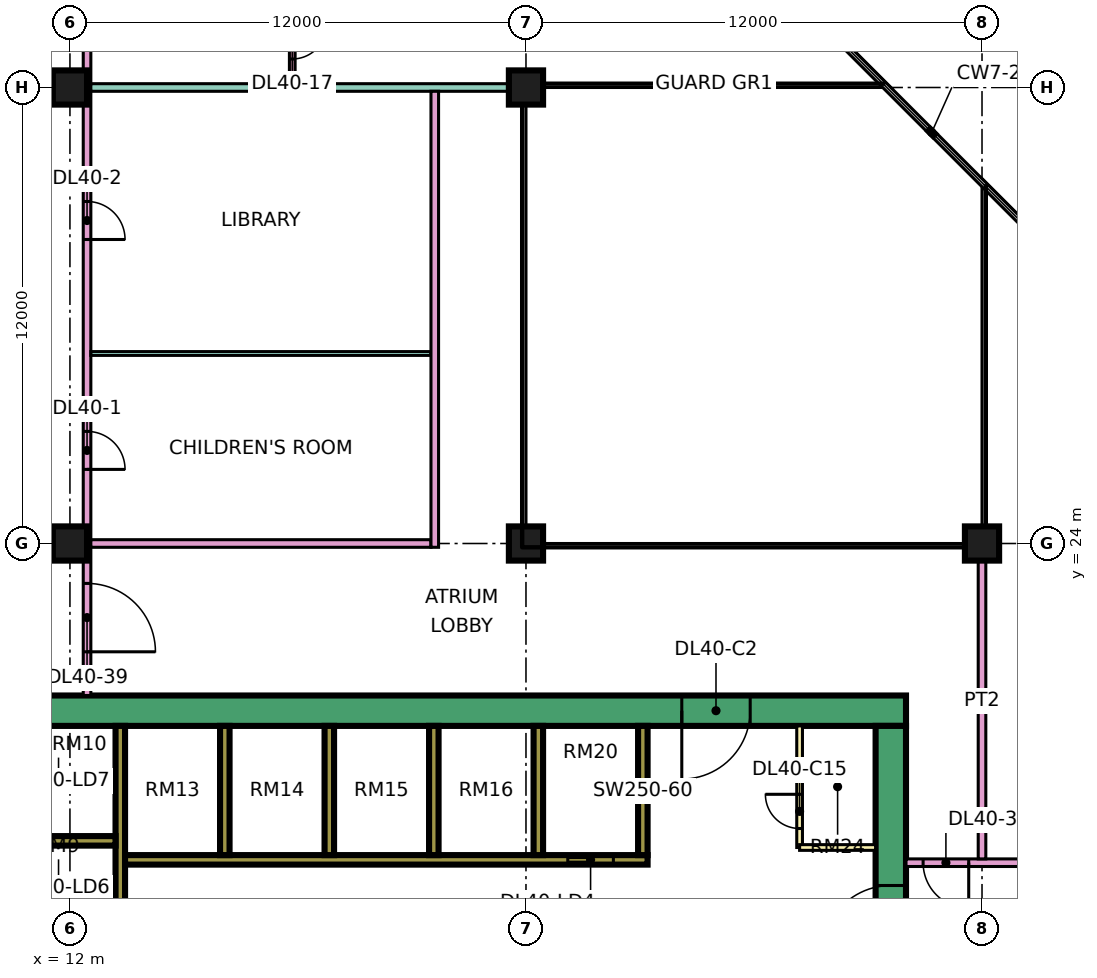
"""IFC4 building model, lengths in metres.
Left out: names, types, materials, properties, quantities, classifications, styles, units other than length and angle.
Written with IfcOpenShell. Run it as: python <this file> out.ifc"""

import sys

from ifc_helpers import new_model, si_unit, direction, frame, frame_2d, origin, origin_2d, place, context, subcontext, project, spatial, rectangle, extrude, element, fill, save


model = new_model("IFC4")
c1 = context("Model", 3, precision=1e-05, world=origin(), true_north=direction((0.0, 1.0)))
c2 = subcontext(c1, "Body", "Model", "MODEL_VIEW")
j1 = project(units=[si_unit("LENGTHUNIT", "METRE"), si_unit("PLANEANGLEUNIT", "RADIAN")], contexts=[c1])
p1 = place(None, origin())
s1 = spatial("IfcSite", under=j1, at=p1, CompositionType="ELEMENT")
p2 = place(p1, origin())
s2 = spatial("IfcBuilding", under=s1, at=p2, CompositionType="ELEMENT")
p3 = place(p2, frame((0.0, 0.0, 176.15)))
s3 = spatial("IfcBuildingStorey", under=s2, at=p3, CompositionType="ELEMENT", Elevation=176.15)
for number, where, z_axis, x_axis in (
    (1, (12.0, 24.0, 0.0), (0.0, 0.0, 1.0), (1.0, 0.0, 0.0)),
    (2, (12.0, 36.0, 0.0), (0.0, 0.0, 1.0), (1.0, 0.0, 0.0)),
    (3, (24.0, 24.0, 0.0), (0.0, 0.0, 1.0), (1.0, 0.0, 0.0)),
    (4, (24.0, 36.0, 0.0), (0.0, 0.0, 1.0), (1.0, 0.0, 0.0)),
    (5, (36.0, 24.0, 0.0), (0.0, 0.0, 1.0), (1.0, 0.0, 0.0)),
):
    element("IfcColumn", number, at=place(p3, frame(where, z_axis=z_axis, x_axis=x_axis)), inside=s3, PredefinedType="COLUMN", context=c2, shape_type="SweptSolid", body=[
        extrude(rectangle(XDim=0.9, YDim=0.9, at=origin_2d()), origin(), (0.0, 0.0, 1.0), 3.75),
    ])
p4 = place(p3, frame((9.0, 19.6, 0.0), z_axis=(0.0, 0.0, 1.0), x_axis=(1.0, 0.0, 0.0)))
e6 = element("IfcWall", 6, at=p4, inside=s3, PredefinedType="SHEAR", context=c2, shape_type="SweptSolid", body=[
    extrude(rectangle(XDim=25.0, YDim=0.8, at=frame_2d((12.5, 0.0))), origin(), (0.0, 0.0, 1.0), 3.75),
])
p5 = place(p4, frame((19.1, 0.0, 0.0)))
e7 = element("IfcOpeningElement", 7, at=p5, cuts=e6, PredefinedType="OPENING", context=c2, shape_type="SweptSolid", body=[
    extrude(rectangle(XDim=1.8, YDim=2.4, at=frame_2d((0.9, 1.2))), frame((0.0, 0.41, 0.0), z_axis=(0.0, -1.0, 0.0), x_axis=(1.0, 0.0, 0.0)), (0.0, 0.0, 1.0), 0.82),
])
p6 = place(p3, frame((33.6, 7.8, 0.0), z_axis=(0.0, 0.0, 1.0), x_axis=(0.0, 1.0, 0.0)))
e8 = element("IfcWall", 8, at=p6, inside=s3, PredefinedType="SHEAR", context=c2, shape_type="SweptSolid", body=[
    extrude(rectangle(XDim=11.4, YDim=0.8, at=frame_2d((5.7, 0.0))), origin(), (0.0, 0.0, 1.0), 3.75),
])
p7 = place(p6, frame((5.4, 0.0, 0.0)))
e9 = element("IfcOpeningElement", 9, at=p7, cuts=e8, PredefinedType="OPENING", context=c2, shape_type="SweptSolid", body=[
    extrude(rectangle(XDim=1.8, YDim=2.4, at=frame_2d((0.9, 1.2))), frame((0.0, 0.41, 0.0), z_axis=(0.0, -1.0, 0.0), x_axis=(1.0, 0.0, 0.0)), (0.0, 0.0, 1.0), 0.82),
])
p8 = place(p3, frame((13.325, 7.8, 0.0), z_axis=(0.0, 0.0, 1.0), x_axis=(0.0, 1.0, 0.0)))
e10 = element("IfcWall", 10, at=p8, inside=s3, PredefinedType="SHEAR", context=c2, shape_type="SweptSolid", body=[
    extrude(rectangle(XDim=11.4, YDim=0.25, at=frame_2d((5.7, 0.0))), origin(), (0.0, 0.0, 1.0), 3.75),
])
p9 = place(p3, frame((13.45, 15.675, 0.0), z_axis=(0.0, 0.0, 1.0), x_axis=(1.0, 0.0, 0.0)))
e11 = element("IfcWall", 11, at=p9, inside=s3, PredefinedType="SHEAR", context=c2, shape_type="SweptSolid", body=[
    extrude(rectangle(XDim=13.75, YDim=0.25, at=frame_2d((6.875, 0.0))), origin(), (0.0, 0.0, 1.0), 3.75),
])
p10 = place(p9, frame((11.65, 0.0, 0.0)))
e12 = element("IfcOpeningElement", 12, at=p10, cuts=e11, PredefinedType="OPENING", context=c2, shape_type="SweptSolid", body=[
    extrude(rectangle(XDim=1.2, YDim=2.2, at=frame_2d((0.6, 1.1))), frame((0.0, 0.135, 0.0), z_axis=(0.0, -1.0, 0.0), x_axis=(1.0, 0.0, 0.0)), (0.0, 0.0, 1.0), 0.27),
])
p11 = place(p3, frame((10.2, 16.175, 0.0), z_axis=(0.0, 0.0, 1.0), x_axis=(1.0, 0.0, 0.0)))
e13 = element("IfcWall", 13, at=p11, inside=s3, PredefinedType="SHEAR", context=c2, shape_type="SweptSolid", body=[
    extrude(rectangle(XDim=3.0, YDim=0.25, at=frame_2d((1.5, 0.0))), origin(), (0.0, 0.0, 1.0), 3.75),
])
for number, where, z_axis, x_axis in (
    (14, (16.075, 15.8, 0.0), (0.0, 0.0, 1.0), (0.0, 1.0, 0.0)),
    (15, (18.825, 15.8, 0.0), (0.0, 0.0, 1.0), (0.0, 1.0, 0.0)),
    (16, (21.575, 15.8, 0.0), (0.0, 0.0, 1.0), (0.0, 1.0, 0.0)),
    (17, (24.325, 15.8, 0.0), (0.0, 0.0, 1.0), (0.0, 1.0, 0.0)),
    (18, (27.075, 15.8, 0.0), (0.0, 0.0, 1.0), (0.0, 1.0, 0.0)),
):
    element("IfcWall", number, at=place(p3, frame(where, z_axis=z_axis, x_axis=x_axis)), inside=s3, PredefinedType="SHEAR", context=c2, shape_type="SweptSolid", body=[
        extrude(rectangle(XDim=3.4, YDim=0.25, at=frame_2d((1.7, 0.0))), origin(), (0.0, 0.0, 1.0), 3.75),
    ])
p12 = place(p3, frame((31.2, 16.0, 0.0), z_axis=(0.0, 0.0, 1.0), x_axis=(0.0, 1.0, 0.0)))
e19 = element("IfcWall", 19, at=p12, inside=s3, PredefinedType="PARTITIONING", context=c2, shape_type="SweptSolid", body=[
    extrude(rectangle(XDim=3.2, YDim=0.15, at=frame_2d((1.6, 0.0))), origin(), (0.0, 0.0, 1.0), 3.35),
])
p13 = place(p12, frame((0.5, 0.0, 0.0)))
e20 = element("IfcOpeningElement", 20, at=p13, cuts=e19, PredefinedType="OPENING", context=c2, shape_type="SweptSolid", body=[
    extrude(rectangle(XDim=0.9, YDim=2.1, at=frame_2d((0.45, 1.05))), frame((0.0, 0.085, 0.0), z_axis=(0.0, -1.0, 0.0), x_axis=(1.0, 0.0, 0.0)), (0.0, 0.0, 1.0), 0.17),
])
p14 = place(p3, frame((31.2, 16.0, 0.0), z_axis=(0.0, 0.0, 1.0), x_axis=(1.0, 0.0, 0.0)))
e21 = element("IfcWall", 21, at=p14, inside=s3, PredefinedType="PARTITIONING", context=c2, shape_type="SweptSolid", body=[
    extrude(rectangle(XDim=2.0, YDim=0.15, at=frame_2d((1.0, 0.0))), origin(), (0.0, 0.0, 1.0), 3.35),
])
p15 = place(p3, frame((12.45, 20.0, 0.0), z_axis=(0.0, 0.0, 1.0), x_axis=(0.0, 1.0, 0.0)))
e22 = element("IfcWall", 22, at=p15, inside=s3, PredefinedType="PARTITIONING", context=c2, shape_type="SweptSolid", body=[
    extrude(rectangle(XDim=43.0, YDim=0.2, at=frame_2d((21.5, 0.0))), origin(), (0.0, 0.0, 1.0), 3.35),
])
p16 = place(p15, frame((5.95, 0.0, 0.0)))
e23 = element("IfcOpeningElement", 23, at=p16, cuts=e22, PredefinedType="OPENING", context=c2, shape_type="SweptSolid", body=[
    extrude(rectangle(XDim=1.0, YDim=2.1, at=frame_2d((0.5, 1.05))), frame((0.0, 0.11, 0.0), z_axis=(0.0, -1.0, 0.0), x_axis=(1.0, 0.0, 0.0)), (0.0, 0.0, 1.0), 0.22),
])
p17 = place(p15, frame((12.0, 0.0, 0.0)))
e24 = element("IfcOpeningElement", 24, at=p17, cuts=e22, PredefinedType="OPENING", context=c2, shape_type="SweptSolid", body=[
    extrude(rectangle(XDim=1.0, YDim=2.1, at=frame_2d((0.5, 1.05))), frame((0.0, 0.11, 0.0), z_axis=(0.0, -1.0, 0.0), x_axis=(1.0, 0.0, 0.0)), (0.0, 0.0, 1.0), 0.22),
])
p18 = place(p15, frame((22.75, 0.0, 0.0)))
e25 = element("IfcOpeningElement", 25, at=p18, cuts=e22, PredefinedType="OPENING", context=c2, shape_type="SweptSolid", body=[
    extrude(rectangle(XDim=1.0, YDim=2.1, at=frame_2d((0.5, 1.05))), frame((0.0, 0.11, 0.0), z_axis=(0.0, -1.0, 0.0), x_axis=(1.0, 0.0, 0.0)), (0.0, 0.0, 1.0), 0.22),
])
p19 = place(p15, frame((34.75, 0.0, 0.0)))
e26 = element("IfcOpeningElement", 26, at=p19, cuts=e22, PredefinedType="OPENING", context=c2, shape_type="SweptSolid", body=[
    extrude(rectangle(XDim=1.0, YDim=2.1, at=frame_2d((0.5, 1.05))), frame((0.0, 0.11, 0.0), z_axis=(0.0, -1.0, 0.0), x_axis=(1.0, 0.0, 0.0)), (0.0, 0.0, 1.0), 0.22),
])
p20 = place(p15, frame((1.15, 0.0, 0.0)))
e27 = element("IfcOpeningElement", 27, at=p20, cuts=e22, PredefinedType="OPENING", context=c2, shape_type="SweptSolid", body=[
    extrude(rectangle(XDim=1.8, YDim=2.1, at=frame_2d((0.9, 1.05))), frame((0.0, 0.11, 0.0), z_axis=(0.0, -1.0, 0.0), x_axis=(1.0, 0.0, 0.0)), (0.0, 0.0, 1.0), 0.22),
])
p21 = place(p15, frame((28.6, 0.0, 0.0)))
e28 = element("IfcOpeningElement", 28, at=p21, cuts=e22, PredefinedType="OPENING", context=c2, shape_type="SweptSolid", body=[
    extrude(rectangle(XDim=1.8, YDim=2.1, at=frame_2d((0.9, 1.05))), frame((0.0, 0.11, 0.0), z_axis=(0.0, -1.0, 0.0), x_axis=(1.0, 0.0, 0.0)), (0.0, 0.0, 1.0), 0.22),
])
p22 = place(p3, frame((12.55, 24.0, 0.0), z_axis=(0.0, 0.0, 1.0), x_axis=(1.0, 0.0, 0.0)))
e29 = element("IfcWall", 29, at=p22, inside=s3, PredefinedType="PARTITIONING", context=c2, shape_type="SweptSolid", body=[
    extrude(rectangle(XDim=8.95, YDim=0.2, at=frame_2d((4.475, 0.0))), origin(), (0.0, 0.0, 1.0), 3.35),
])
p23 = place(p3, frame((12.55, 29.0, 0.0), z_axis=(0.0, 0.0, 1.0), x_axis=(1.0, 0.0, 0.0)))
e30 = element("IfcWall", 30, at=p23, inside=s3, PredefinedType="PARTITIONING", context=c2, shape_type="SweptSolid", body=[
    extrude(rectangle(XDim=8.95, YDim=0.1, at=frame_2d((4.475, 0.0))), origin(), (0.0, 0.0, 1.0), 3.35),
])
p24 = place(p3, frame((12.55, 36.0, 0.0), z_axis=(0.0, 0.0, 1.0), x_axis=(1.0, 0.0, 0.0)))
e31 = element("IfcWall", 31, at=p24, inside=s3, PredefinedType="PARTITIONING", context=c2, shape_type="SweptSolid", body=[
    extrude(rectangle(XDim=11.45, YDim=0.2, at=frame_2d((5.725, 0.0))), origin(), (0.0, 0.0, 1.0), 3.35),
])
p25 = place(p3, frame((17.85, 36.1, 0.0), z_axis=(0.0, 0.0, 1.0), x_axis=(0.0, 1.0, 0.0)))
e32 = element("IfcWall", 32, at=p25, inside=s3, PredefinedType="PARTITIONING", context=c2, shape_type="SweptSolid", body=[
    extrude(rectangle(XDim=5.225, YDim=0.15, at=frame_2d((2.612, 0.0))), origin(), (0.0, 0.0, 1.0), 3.35),
])
p26 = place(p25, frame((3.45, 0.0, 0.0)))
e33 = element("IfcOpeningElement", 33, at=p26, cuts=e32, PredefinedType="OPENING", context=c2, shape_type="SweptSolid", body=[
    extrude(rectangle(XDim=0.8, YDim=2.1, at=frame_2d((0.4, 1.05))), frame((0.0, 0.085, 0.0), z_axis=(0.0, -1.0, 0.0), x_axis=(1.0, 0.0, 0.0)), (0.0, 0.0, 1.0), 0.17),
])
p27 = place(p25, frame((0.65, 0.0, 0.0)))
e34 = element("IfcOpeningElement", 34, at=p27, cuts=e32, PredefinedType="OPENING", context=c2, shape_type="SweptSolid", body=[
    extrude(rectangle(XDim=0.9, YDim=2.1, at=frame_2d((0.45, 1.05))), frame((0.0, 0.085, 0.0), z_axis=(0.0, -1.0, 0.0), x_axis=(1.0, 0.0, 0.0)), (0.0, 0.0, 1.0), 0.17),
])
p28 = place(p3, frame((21.6, 23.9, 0.0), z_axis=(0.0, 0.0, 1.0), x_axis=(0.0, 1.0, 0.0)))
e35 = element("IfcWall", 35, at=p28, inside=s3, PredefinedType="PARTITIONING", context=c2, shape_type="SweptSolid", body=[
    extrude(rectangle(XDim=12.0, YDim=0.2, at=frame_2d((6.0, 0.0))), origin(), (0.0, 0.0, 1.0), 3.35),
])
p29 = place(p3, frame((34.0, 15.6, 0.0), z_axis=(0.0, 0.0, 1.0), x_axis=(1.0, 0.0, 0.0)))
e36 = element("IfcWall", 36, at=p29, inside=s3, PredefinedType="PARTITIONING", context=c2, shape_type="SweptSolid", body=[
    extrude(rectangle(XDim=10.35, YDim=0.2, at=frame_2d((5.175, 0.0))), origin(), (0.0, 0.0, 1.0), 3.35),
])
p30 = place(p29, frame((5.6, 0.0, 0.0)))
e37 = element("IfcOpeningElement", 37, at=p30, cuts=e36, PredefinedType="OPENING", context=c2, shape_type="SweptSolid", body=[
    extrude(rectangle(XDim=1.0, YDim=2.1, at=frame_2d((0.5, 1.05))), frame((0.0, 0.11, 0.0), z_axis=(0.0, -1.0, 0.0), x_axis=(1.0, 0.0, 0.0)), (0.0, 0.0, 1.0), 0.22),
])
p31 = place(p29, frame((0.45, 0.0, 0.0)))
e38 = element("IfcOpeningElement", 38, at=p31, cuts=e36, PredefinedType="OPENING", context=c2, shape_type="SweptSolid", body=[
    extrude(rectangle(XDim=1.2, YDim=2.1, at=frame_2d((0.6, 1.05))), frame((0.0, 0.11, 0.0), z_axis=(0.0, -1.0, 0.0), x_axis=(1.0, 0.0, 0.0)), (0.0, 0.0, 1.0), 0.22),
])
p32 = place(p3, frame((36.0, 15.7, 0.0), z_axis=(0.0, 0.0, 1.0), x_axis=(0.0, 1.0, 0.0)))
e39 = element("IfcWall", 39, at=p32, inside=s3, PredefinedType="PARTITIONING", context=c2, shape_type="SweptSolid", body=[
    extrude(rectangle(XDim=8.3, YDim=0.2, at=frame_2d((4.15, 0.0))), origin(), (0.0, 0.0, 1.0), 3.35),
])
p33 = place(p10, origin())
e40 = element("IfcDoor", 40, at=p33, inside=s3, OperationType="DOUBLE_DOOR_SLIDING", PredefinedType="DOOR", context=c2, shape_type="SweptSolid", body=[
    extrude(rectangle(XDim=1.2, YDim=2.2, at=frame_2d((0.6, 1.1))), frame((0.0, 0.025, 0.0), z_axis=(0.0, -1.0, 0.0), x_axis=(1.0, 0.0, 0.0)), (0.0, 0.0, 1.0), 0.05),
])
fill(e12, e40)
p34 = place(p7, origin())
e41 = element("IfcDoor", 41, at=p34, inside=s3, OperationType="DOUBLE_DOOR_SINGLE_SWING", PredefinedType="DOOR", context=c2, shape_type="SweptSolid", body=[
    extrude(rectangle(XDim=1.8, YDim=2.4, at=frame_2d((0.9, 1.2))), frame((0.0, 0.025, 0.0), z_axis=(0.0, -1.0, 0.0), x_axis=(1.0, 0.0, 0.0)), (0.0, 0.0, 1.0), 0.05),
])
fill(e9, e41)
p35 = place(p5, frame((1.8, 0.0, 0.0), z_axis=(0.0, 0.0, 1.0), x_axis=(-1.0, 0.0, 0.0)))
e42 = element("IfcDoor", 42, at=p35, inside=s3, OperationType="DOUBLE_DOOR_SINGLE_SWING", PredefinedType="DOOR", context=c2, shape_type="SweptSolid", body=[
    extrude(rectangle(XDim=1.8, YDim=2.4, at=frame_2d((0.9, 1.2))), frame((0.0, 0.025, 0.0), z_axis=(0.0, -1.0, 0.0), x_axis=(1.0, 0.0, 0.0)), (0.0, 0.0, 1.0), 0.05),
])
fill(e7, e42)
p36 = place(p13, frame((0.9, 0.0, 0.0), z_axis=(0.0, 0.0, 1.0), x_axis=(-1.0, 0.0, 0.0)))
e43 = element("IfcDoor", 43, at=p36, inside=s3, OperationType="SINGLE_SWING_RIGHT", PredefinedType="DOOR", context=c2, shape_type="SweptSolid", body=[
    extrude(rectangle(XDim=0.9, YDim=2.1, at=frame_2d((0.45, 1.05))), frame((0.0, 0.025, 0.0), z_axis=(0.0, -1.0, 0.0), x_axis=(1.0, 0.0, 0.0)), (0.0, 0.0, 1.0), 0.05),
])
fill(e20, e43)
p37 = place(p16, frame((1.0, 0.0, 0.0), z_axis=(0.0, 0.0, 1.0), x_axis=(-1.0, 0.0, 0.0)))
e44 = element("IfcDoor", 44, at=p37, inside=s3, OperationType="SINGLE_SWING_LEFT", PredefinedType="DOOR", context=c2, shape_type="SweptSolid", body=[
    extrude(rectangle(XDim=1.0, YDim=2.1, at=frame_2d((0.5, 1.05))), frame((0.0, 0.025, 0.0), z_axis=(0.0, -1.0, 0.0), x_axis=(1.0, 0.0, 0.0)), (0.0, 0.0, 1.0), 0.05),
])
fill(e23, e44)
p38 = place(p17, frame((1.0, 0.0, 0.0), z_axis=(0.0, 0.0, 1.0), x_axis=(-1.0, 0.0, 0.0)))
e45 = element("IfcDoor", 45, at=p38, inside=s3, OperationType="SINGLE_SWING_LEFT", PredefinedType="DOOR", context=c2, shape_type="SweptSolid", body=[
    extrude(rectangle(XDim=1.0, YDim=2.1, at=frame_2d((0.5, 1.05))), frame((0.0, 0.025, 0.0), z_axis=(0.0, -1.0, 0.0), x_axis=(1.0, 0.0, 0.0)), (0.0, 0.0, 1.0), 0.05),
])
fill(e24, e45)
p39 = place(p27, origin())
e46 = element("IfcDoor", 46, at=p39, inside=s3, OperationType="SINGLE_SWING_RIGHT", PredefinedType="DOOR", context=c2, shape_type="SweptSolid", body=[
    extrude(rectangle(XDim=0.9, YDim=2.1, at=frame_2d((0.45, 1.05))), frame((0.0, 0.025, 0.0), z_axis=(0.0, -1.0, 0.0), x_axis=(1.0, 0.0, 0.0)), (0.0, 0.0, 1.0), 0.05),
])
fill(e34, e46)
p40 = place(p31, origin())
e47 = element("IfcDoor", 47, at=p40, inside=s3, OperationType="SINGLE_SWING_RIGHT", PredefinedType="DOOR", context=c2, shape_type="SweptSolid", body=[
    extrude(rectangle(XDim=1.2, YDim=2.1, at=frame_2d((0.6, 1.05))), frame((0.0, 0.025, 0.0), z_axis=(0.0, -1.0, 0.0), x_axis=(1.0, 0.0, 0.0)), (0.0, 0.0, 1.0), 0.05),
])
fill(e38, e47)
p41 = place(p20, frame((1.8, 0.0, 0.0), z_axis=(0.0, 0.0, 1.0), x_axis=(-1.0, 0.0, 0.0)))
e48 = element("IfcDoor", 48, at=p41, inside=s3, OperationType="DOUBLE_DOOR_SINGLE_SWING", PredefinedType="DOOR", context=c2, shape_type="SweptSolid", body=[
    extrude(rectangle(XDim=1.8, YDim=2.1, at=frame_2d((0.9, 1.05))), frame((0.0, 0.025, 0.0), z_axis=(0.0, -1.0, 0.0), x_axis=(1.0, 0.0, 0.0)), (0.0, 0.0, 1.0), 0.05),
])
fill(e27, e48)
save(model, sys.argv[1])
